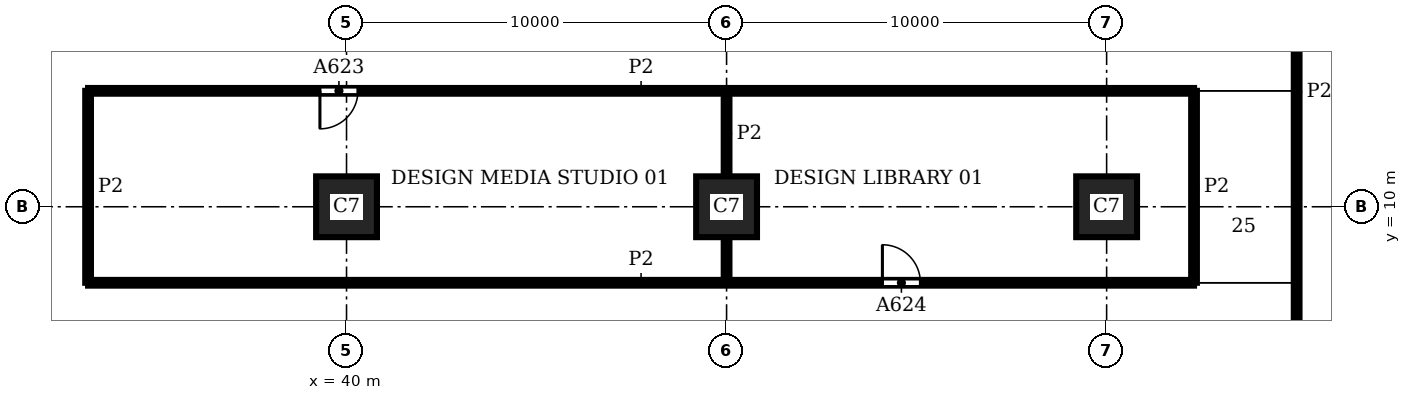
"""IFC4 building model, lengths in metres.
Left out: names, types, materials, properties, quantities, classifications, styles, units other than length and angle.
Written with IfcOpenShell. Run it as: python <this file> out.ifc"""

import sys

from ifc_helpers import new_model, si_unit, direction, frame, frame_2d, origin, origin_2d, place, context, subcontext, project, spatial, rectangle, extrude, element, fill, save


model = new_model("IFC4")
c1 = context("Model", 3, precision=1e-05, world=origin(), true_north=direction((0.0, 1.0)))
c2 = subcontext(c1, "Body", "Model", "MODEL_VIEW")
j1 = project(units=[si_unit("LENGTHUNIT", "METRE"), si_unit("PLANEANGLEUNIT", "RADIAN")], contexts=[c1])
p1 = place(None, origin())
s1 = spatial("IfcSite", under=j1, at=p1, CompositionType="ELEMENT")
p2 = place(p1, origin())
s2 = spatial("IfcBuilding", under=s1, at=p2, CompositionType="ELEMENT")
p3 = place(p2, frame((0.0, 0.0, 70.5)))
s3 = spatial("IfcBuildingStorey", under=s2, at=p3, CompositionType="ELEMENT", Elevation=70.5)
for number, where, z_axis, x_axis in (
    (1, (40.0, 10.0, 0.0), (0.0, 0.0, 1.0), (1.0, 0.0, 0.0)),
    (2, (50.0, 10.0, 0.0), (0.0, 0.0, 1.0), (1.0, 0.0, 0.0)),
    (3, (60.0, 10.0, 0.0), (0.0, 0.0, 1.0), (1.0, 0.0, 0.0)),
):
    element("IfcColumn", number, at=place(p3, frame(where, z_axis=z_axis, x_axis=x_axis)), inside=s3, PredefinedType="COLUMN", context=c2, shape_type="SweptSolid", body=[
        extrude(rectangle(XDim=1.6, YDim=1.6, at=origin_2d()), origin(), (0.0, 0.0, 1.0), 3.9),
    ])
p4 = place(p3, frame((33.2, 8.0, 0.0), z_axis=(0.0, 0.0, 1.0), x_axis=(0.0, 1.0, 0.0)))
e4 = element("IfcWall", 4, at=p4, inside=s3, PredefinedType="PARTITIONING", context=c2, shape_type="SweptSolid", body=[
    extrude(rectangle(XDim=5.05, YDim=0.15, at=frame_2d((2.525, 0.0))), origin(), (0.0, 0.0, 1.0), 3.58),
])
p5 = place(p3, frame((50.0, 8.0, 0.0), z_axis=(0.0, 0.0, 1.0), x_axis=(0.0, 1.0, 0.0)))
e5 = element("IfcWall", 5, at=p5, inside=s3, PredefinedType="PARTITIONING", context=c2, shape_type="SweptSolid", body=[
    extrude(rectangle(XDim=1.2, YDim=0.15, at=frame_2d((0.6, 0.0))), origin(), (0.0, 0.0, 1.0), 3.58),
])
p6 = place(p3, frame((50.0, 10.8, 0.0), z_axis=(0.0, 0.0, 1.0), x_axis=(0.0, 1.0, 0.0)))
e6 = element("IfcWall", 6, at=p6, inside=s3, PredefinedType="PARTITIONING", context=c2, shape_type="SweptSolid", body=[
    extrude(rectangle(XDim=2.25, YDim=0.15, at=frame_2d((1.125, 0.0))), origin(), (0.0, 0.0, 1.0), 3.58),
])
p7 = place(p3, frame((62.3, 8.0, 0.0), z_axis=(0.0, 0.0, 1.0), x_axis=(0.0, 1.0, 0.0)))
e7 = element("IfcWall", 7, at=p7, inside=s3, PredefinedType="PARTITIONING", context=c2, shape_type="SweptSolid", body=[
    extrude(rectangle(XDim=5.05, YDim=0.15, at=frame_2d((2.525, 0.0))), origin(), (0.0, 0.0, 1.0), 3.58),
])
p8 = place(p3, frame((65.0, 5.6, 0.0), z_axis=(0.0, 0.0, 1.0), x_axis=(0.0, 1.0, 0.0)))
e8 = element("IfcWall", 8, at=p8, inside=s3, PredefinedType="PARTITIONING", context=c2, shape_type="SweptSolid", body=[
    extrude(rectangle(XDim=14.85, YDim=0.15, at=frame_2d((7.425, 0.0))), origin(), (0.0, 0.0, 1.0), 3.58),
])
p9 = place(p3, frame((33.2, 8.0, 0.0), z_axis=(0.0, 0.0, 1.0), x_axis=(1.0, 0.0, 0.0)))
e9 = element("IfcWall", 9, at=p9, inside=s3, PredefinedType="PARTITIONING", context=c2, shape_type="SweptSolid", body=[
    extrude(rectangle(XDim=29.1, YDim=0.15, at=frame_2d((14.55, 0.0))), origin(), (0.0, 0.0, 1.0), 3.58),
])
p10 = place(p9, frame((20.9, 0.0, 0.0)))
e10 = element("IfcOpeningElement", 10, at=p10, cuts=e9, PredefinedType="OPENING", context=c2, shape_type="SweptSolid", body=[
    extrude(rectangle(XDim=1.0, YDim=2.1, at=frame_2d((0.5, 1.05))), frame((0.0, 0.085, 0.0), z_axis=(0.0, -1.0, 0.0), x_axis=(1.0, 0.0, 0.0)), (0.0, 0.0, 1.0), 0.17),
])
p11 = place(p3, frame((33.2, 13.05, 0.0), z_axis=(0.0, 0.0, 1.0), x_axis=(1.0, 0.0, 0.0)))
e11 = element("IfcWall", 11, at=p11, inside=s3, PredefinedType="PARTITIONING", context=c2, shape_type="SweptSolid", body=[
    extrude(rectangle(XDim=29.1, YDim=0.15, at=frame_2d((14.55, 0.0))), origin(), (0.0, 0.0, 1.0), 3.58),
])
p12 = place(p11, frame((6.1, 0.0, 0.0)))
e12 = element("IfcOpeningElement", 12, at=p12, cuts=e11, PredefinedType="OPENING", context=c2, shape_type="SweptSolid", body=[
    extrude(rectangle(XDim=1.0, YDim=2.1, at=frame_2d((0.5, 1.05))), frame((0.0, 0.085, 0.0), z_axis=(0.0, -1.0, 0.0), x_axis=(1.0, 0.0, 0.0)), (0.0, 0.0, 1.0), 0.17),
])
p13 = place(p12, frame((1.0, 0.0, 0.0), z_axis=(0.0, 0.0, 1.0), x_axis=(-1.0, 0.0, 0.0)))
e13 = element("IfcDoor", 13, at=p13, inside=s3, OperationType="SINGLE_SWING_RIGHT", PredefinedType="DOOR", context=c2, shape_type="SweptSolid", body=[
    extrude(rectangle(XDim=1.0, YDim=2.1, at=frame_2d((0.5, 1.05))), frame((0.0, 0.025, 0.0), z_axis=(0.0, -1.0, 0.0), x_axis=(1.0, 0.0, 0.0)), (0.0, 0.0, 1.0), 0.05),
])
fill(e12, e13)
p14 = place(p10, origin())
e14 = element("IfcDoor", 14, at=p14, inside=s3, OperationType="SINGLE_SWING_LEFT", PredefinedType="DOOR", context=c2, shape_type="SweptSolid", body=[
    extrude(rectangle(XDim=1.0, YDim=2.1, at=frame_2d((0.5, 1.05))), frame((0.0, 0.025, 0.0), z_axis=(0.0, -1.0, 0.0), x_axis=(1.0, 0.0, 0.0)), (0.0, 0.0, 1.0), 0.05),
])
fill(e10, e14)
save(model, sys.argv[1])
